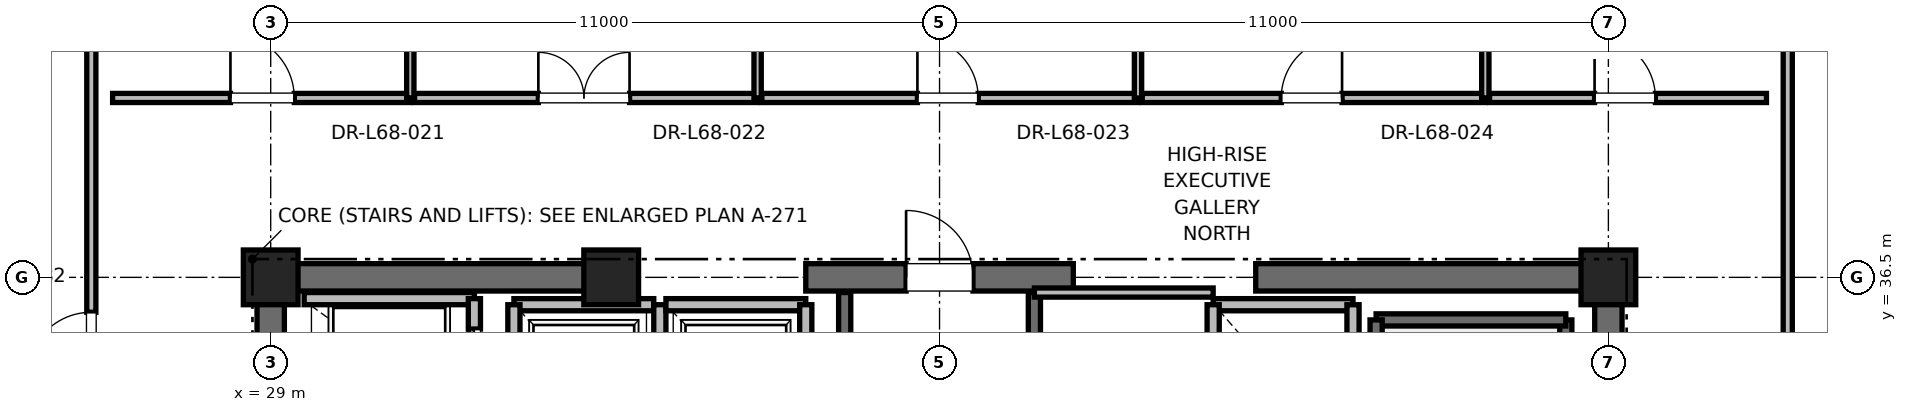
"""IFC4 building model, lengths in metres.
Left out: names, types, materials, properties, quantities, classifications, styles, units other than length and angle.
Written with IfcOpenShell. Run it as: python <this file> out.ifc"""

import sys

from ifc_helpers import new_model, si_unit, direction, frame, frame_2d, origin, origin_2d, place, context, subcontext, project, spatial, rectangle, extrude, element, fill, save


model = new_model("IFC4")
c1 = context("Model", 3, precision=1e-05, world=origin(), true_north=direction((0.0, 1.0)))
c2 = subcontext(c1, "Body", "Model", "MODEL_VIEW")
j1 = project(units=[si_unit("LENGTHUNIT", "METRE"), si_unit("PLANEANGLEUNIT", "RADIAN")], contexts=[c1])
p1 = place(None, origin())
s1 = spatial("IfcSite", under=j1, at=p1, CompositionType="ELEMENT")
p2 = place(p1, origin())
s2 = spatial("IfcBuilding", under=s1, at=p2, CompositionType="ELEMENT")
p3 = place(p2, frame((0.0, 0.0, 291.2)))
s3 = spatial("IfcBuildingStorey", under=s2, at=p3, CompositionType="ELEMENT", Elevation=291.2)
for number, where, z_axis, x_axis in (
    (1, (29.0, 36.5, 0.0), (0.0, 0.0, 1.0), (1.0, 0.0, 0.0)),
    (2, (51.0, 36.5, 0.0), (0.0, 0.0, 1.0), (1.0, 0.0, 0.0)),
    (3, (34.6, 36.5, 0.0), (0.0, 0.0, 1.0), (1.0, 0.0, 0.0)),
):
    element("IfcColumn", number, at=place(p3, frame(where, z_axis=z_axis, x_axis=x_axis)), inside=s3, PredefinedType="PILASTER", context=c2, shape_type="SweptSolid", body=[
        extrude(rectangle(XDim=0.9, YDim=0.9, at=origin_2d()), origin(), (0.0, 0.0, 1.0), 4.0),
    ])
p4 = place(p3, frame((29.0, 36.5, 0.0), z_axis=(0.0, 0.0, 1.0), x_axis=(1.0, 0.0, 0.0)))
e4 = element("IfcWall", 4, at=p4, inside=s3, PredefinedType="SHEAR", context=c2, shape_type="SweptSolid", body=[
    extrude(rectangle(XDim=5.8, YDim=0.45, at=frame_2d((2.9, 0.0))), origin(), (0.0, 0.0, 1.0), 3.7),
])
p5 = place(p3, frame((37.8, 36.5, 0.0), z_axis=(0.0, 0.0, 1.0), x_axis=(1.0, 0.0, 0.0)))
e5 = element("IfcWall", 5, at=p5, inside=s3, PredefinedType="SHEAR", context=c2, shape_type="SweptSolid", body=[
    extrude(rectangle(XDim=4.4, YDim=0.45, at=frame_2d((2.2, 0.0))), origin(), (0.0, 0.0, 1.0), 3.7),
])
p6 = place(p5, frame((1.65, 0.0, 0.0)))
e6 = element("IfcOpeningElement", 6, at=p6, cuts=e5, PredefinedType="OPENING", context=c2, shape_type="SweptSolid", body=[
    extrude(rectangle(XDim=1.1, YDim=2.15, at=frame_2d((0.55, 1.075))), frame((0.0, 0.225, 0.0), z_axis=(0.0, -1.0, 0.0), x_axis=(1.0, 0.0, 0.0)), (0.0, 0.0, 1.0), 0.45),
])
for number, where, z_axis, x_axis in (
    (7, (45.2, 36.5, 0.0), (0.0, 0.0, 1.0), (1.0, 0.0, 0.0)),
    (8, (29.0, 30.7, 0.0), (0.0, 0.0, 1.0), (0.0, 1.0, 0.0)),
):
    element("IfcWall", number, at=place(p3, frame(where, z_axis=z_axis, x_axis=x_axis)), inside=s3, PredefinedType="SHEAR", context=c2, shape_type="SweptSolid", body=[
        extrude(rectangle(XDim=5.8, YDim=0.45, at=frame_2d((2.9, 0.0))), origin(), (0.0, 0.0, 1.0), 3.7),
    ])
p7 = place(p3, frame((51.0, 27.7, 0.0), z_axis=(0.0, 0.0, 1.0), x_axis=(0.0, 1.0, 0.0)))
e9 = element("IfcWall", 9, at=p7, inside=s3, PredefinedType="SHEAR", context=c2, shape_type="SweptSolid", body=[
    extrude(rectangle(XDim=8.8, YDim=0.45, at=frame_2d((4.4, 0.0))), origin(), (0.0, 0.0, 1.0), 3.7),
])
p8 = place(p3, frame((50.3, 27.65, 0.0), z_axis=(0.0, 0.0, 1.0), x_axis=(0.0, 1.0, 0.0)))
e10 = element("IfcWall", 10, at=p8, inside=s3, PredefinedType="SOLIDWALL", context=c2, shape_type="SweptSolid", body=[
    extrude(rectangle(XDim=8.15, YDim=0.2, at=frame_2d((4.075, 0.0))), origin(), (0.0, 0.0, 1.0), 3.7),
])
p9 = place(p3, frame((47.18, 35.8, 0.0), z_axis=(0.0, 0.0, 1.0), x_axis=(1.0, 0.0, 0.0)))
e11 = element("IfcWall", 11, at=p9, inside=s3, PredefinedType="SOLIDWALL", context=c2, shape_type="SweptSolid", body=[
    extrude(rectangle(XDim=3.12, YDim=0.2, at=frame_2d((1.56, 0.0))), origin(), (0.0, 0.0, 1.0), 3.7),
])
p10 = place(p3, frame((47.18, 27.62, 0.0), z_axis=(0.0, 0.0, 1.0), x_axis=(0.0, 1.0, 0.0)))
e12 = element("IfcWall", 12, at=p10, inside=s3, PredefinedType="SOLIDWALL", context=c2, shape_type="SweptSolid", body=[
    extrude(rectangle(XDim=8.18, YDim=0.2, at=frame_2d((4.09, 0.0))), origin(), (0.0, 0.0, 1.0), 3.7),
])
p11 = place(p3, frame((38.44, 27.38, 0.0), z_axis=(0.0, 0.0, 1.0), x_axis=(0.0, 1.0, 0.0)))
e13 = element("IfcWall", 13, at=p11, inside=s3, PredefinedType="SOLIDWALL", context=c2, shape_type="SweptSolid", body=[
    extrude(rectangle(XDim=8.87, YDim=0.2, at=frame_2d((4.435, 0.0))), origin(), (0.0, 0.0, 1.0), 3.7),
])
p12 = place(p3, frame((41.56, 27.68, 0.0), z_axis=(0.0, 0.0, 1.0), x_axis=(0.0, 1.0, 0.0)))
e14 = element("IfcWall", 14, at=p12, inside=s3, PredefinedType="SOLIDWALL", context=c2, shape_type="SweptSolid", body=[
    extrude(rectangle(XDim=8.57, YDim=0.2, at=frame_2d((4.285, 0.0))), origin(), (0.0, 0.0, 1.0), 3.7),
])
p13 = place(p3, frame((32.35, 36.15, 0.0), z_axis=(0.0, 0.0, 1.0), x_axis=(-1.0, 0.0, 0.0)))
e15 = element("IfcWall", 15, at=p13, inside=s3, PredefinedType="SOLIDWALL", context=c2, shape_type="SweptSolid", body=[
    extrude(rectangle(XDim=2.8, YDim=0.2, at=frame_2d((1.4, 0.0))), origin(), (0.0, 0.0, 1.0), 2.753),
])
p14 = place(p3, frame((32.35, 34.05, 0.0), z_axis=(0.0, 0.0, 1.0), x_axis=(0.0, 1.0, 0.0)))
e16 = element("IfcWall", 16, at=p14, inside=s3, PredefinedType="SOLIDWALL", context=c2, shape_type="SweptSolid", body=[
    extrude(rectangle(XDim=2.1, YDim=0.2, at=frame_2d((1.05, 0.0))), origin(), (0.0, 0.0, 1.0), 3.7),
])
p15 = place(p14, frame((0.5, 0.0, 0.0)))
e17 = element("IfcOpeningElement", 17, at=p15, cuts=e16, PredefinedType="OPENING", context=c2, shape_type="SweptSolid", body=[
    extrude(rectangle(XDim=1.1, YDim=2.2, at=frame_2d((0.55, 1.1))), frame((0.0, 0.1, 0.0), z_axis=(0.0, -1.0, 0.0), x_axis=(1.0, 0.0, 0.0)), (0.0, 0.0, 1.0), 0.2),
])
p16 = place(p3, frame((35.3, 36.05, 0.0), z_axis=(0.0, 0.0, 1.0), x_axis=(-1.0, 0.0, 0.0)))
e18 = element("IfcWall", 18, at=p16, inside=s3, PredefinedType="SOLIDWALL", context=c2, shape_type="SweptSolid", body=[
    extrude(rectangle(XDim=2.3, YDim=0.2, at=frame_2d((1.15, 0.0))), origin(), (0.0, 0.0, 1.0), 2.78),
])
p17 = place(p3, frame((33.0, 36.05, 0.0), z_axis=(0.0, 0.0, 1.0), x_axis=(0.0, -1.0, 0.0)))
e19 = element("IfcWall", 19, at=p17, inside=s3, PredefinedType="SOLIDWALL", context=c2, shape_type="SweptSolid", body=[
    extrude(rectangle(XDim=2.6, YDim=0.2, at=frame_2d((1.3, 0.0))), origin(), (0.0, 0.0, 1.0), 3.7),
])
p18 = place(p3, frame((35.4, 33.45, 0.0), z_axis=(0.0, 0.0, 1.0), x_axis=(0.0, 1.0, 0.0)))
e20 = element("IfcWall", 20, at=p18, inside=s3, PredefinedType="SOLIDWALL", context=c2, shape_type="SweptSolid", body=[
    extrude(rectangle(XDim=2.6, YDim=0.2, at=frame_2d((1.3, 0.0))), origin(), (0.0, 0.0, 1.0), 2.78),
])
p19 = place(p3, frame((37.8, 36.05, 0.0), z_axis=(0.0, 0.0, 1.0), x_axis=(-1.0, 0.0, 0.0)))
e21 = element("IfcWall", 21, at=p19, inside=s3, PredefinedType="SOLIDWALL", context=c2, shape_type="SweptSolid", body=[
    extrude(rectangle(XDim=2.3, YDim=0.2, at=frame_2d((1.15, 0.0))), origin(), (0.0, 0.0, 1.0), 2.78),
])
p20 = place(p3, frame((37.8, 33.45, 0.0), z_axis=(0.0, 0.0, 1.0), x_axis=(0.0, 1.0, 0.0)))
e22 = element("IfcWall", 22, at=p20, inside=s3, PredefinedType="SOLIDWALL", context=c2, shape_type="SweptSolid", body=[
    extrude(rectangle(XDim=2.6, YDim=0.2, at=frame_2d((1.3, 0.0))), origin(), (0.0, 0.0, 1.0), 2.78),
])
p21 = place(p3, frame((46.8, 36.05, 0.0), z_axis=(0.0, 0.0, 1.0), x_axis=(-1.0, 0.0, 0.0)))
e23 = element("IfcWall", 23, at=p21, inside=s3, PredefinedType="SOLIDWALL", context=c2, shape_type="SweptSolid", body=[
    extrude(rectangle(XDim=2.3, YDim=0.2, at=frame_2d((1.15, 0.0))), origin(), (0.0, 0.0, 1.0), 2.78),
])
p22 = place(p3, frame((44.5, 36.05, 0.0), z_axis=(0.0, 0.0, 1.0), x_axis=(0.0, -1.0, 0.0)))
e24 = element("IfcWall", 24, at=p22, inside=s3, PredefinedType="SOLIDWALL", context=c2, shape_type="SweptSolid", body=[
    extrude(rectangle(XDim=2.6, YDim=0.2, at=frame_2d((1.3, 0.0))), origin(), (0.0, 0.0, 1.0), 2.78),
])
p23 = place(p3, frame((46.8, 33.45, 0.0), z_axis=(0.0, 0.0, 1.0), x_axis=(0.0, 1.0, 0.0)))
e25 = element("IfcWall", 25, at=p23, inside=s3, PredefinedType="SOLIDWALL", context=c2, shape_type="SweptSolid", body=[
    extrude(rectangle(XDim=2.6, YDim=0.2, at=frame_2d((1.3, 0.0))), origin(), (0.0, 0.0, 1.0), 3.7),
])
p24 = place(p3, frame((41.56, 36.25, 0.0), z_axis=(0.0, 0.0, 1.0), x_axis=(1.0, 0.0, 0.0)))
e26 = element("IfcWall", 26, at=p24, inside=s3, PredefinedType="PARTITIONING", context=c2, shape_type="SweptSolid", body=[
    extrude(rectangle(XDim=2.94, YDim=0.15, at=frame_2d((1.47, 0.0))), origin(), (0.0, 0.0, 1.0), 2.78),
])
p25 = place(p3, frame((26.4, 39.45, 0.0), z_axis=(0.0, 0.0, 1.0), x_axis=(1.0, 0.0, 0.0)))
e27 = element("IfcWall", 27, at=p25, inside=s3, PredefinedType="PARTITIONING", context=c2, shape_type="SweptSolid", body=[
    extrude(rectangle(XDim=4.896, YDim=0.15, at=frame_2d((2.448, 0.0))), origin(), (0.0, 0.0, 1.0), 2.753),
])
p26 = place(p25, frame((1.938, 0.0, 0.0)))
e28 = element("IfcOpeningElement", 28, at=p26, cuts=e27, PredefinedType="OPENING", context=c2, shape_type="SweptSolid", body=[
    extrude(rectangle(XDim=1.05, YDim=2.2, at=frame_2d((0.525, 1.1))), frame((0.0, 0.075, 0.0), z_axis=(0.0, -1.0, 0.0), x_axis=(1.0, 0.0, 0.0)), (0.0, 0.0, 1.0), 0.15),
])
p27 = place(p3, frame((31.296, 39.45, 0.0), z_axis=(0.0, 0.0, 1.0), x_axis=(0.0, 1.0, 0.0)))
e29 = element("IfcWall", 29, at=p27, inside=s3, PredefinedType="PARTITIONING", context=c2, shape_type="SweptSolid", body=[
    extrude(rectangle(XDim=9.831, YDim=0.12, at=frame_2d((4.915, 0.0))), origin(), (0.0, 0.0, 1.0), 2.33),
])
p28 = place(p3, frame((31.366, 39.45, 0.0), z_axis=(0.0, 0.0, 1.0), x_axis=(1.0, 0.0, 0.0)))
e30 = element("IfcWall", 30, at=p28, inside=s3, PredefinedType="PARTITIONING", context=c2, shape_type="SweptSolid", body=[
    extrude(rectangle(XDim=5.642, YDim=0.15, at=frame_2d((2.821, 0.0))), origin(), (0.0, 0.0, 1.0), 2.85),
])
p29 = place(p28, frame((2.036, 0.0, 0.0)))
e31 = element("IfcOpeningElement", 31, at=p29, cuts=e30, PredefinedType="OPENING", context=c2, shape_type="SweptSolid", body=[
    extrude(rectangle(XDim=1.5, YDim=2.25, at=frame_2d((0.75, 1.125))), frame((0.0, 0.075, 0.0), z_axis=(0.0, -1.0, 0.0), x_axis=(1.0, 0.0, 0.0)), (0.0, 0.0, 1.0), 0.15),
])
p30 = place(p3, frame((37.008, 39.45, 0.0), z_axis=(0.0, 0.0, 1.0), x_axis=(0.0, 1.0, 0.0)))
e32 = element("IfcWall", 32, at=p30, inside=s3, PredefinedType="PARTITIONING", context=c2, shape_type="SweptSolid", body=[
    extrude(rectangle(XDim=9.831, YDim=0.12, at=frame_2d((4.915, 0.0))), origin(), (0.0, 0.0, 1.0), 2.33),
])
p31 = place(p3, frame((37.078, 39.45, 0.0), z_axis=(0.0, 0.0, 1.0), x_axis=(1.0, 0.0, 0.0)))
e33 = element("IfcWall", 33, at=p31, inside=s3, PredefinedType="PARTITIONING", context=c2, shape_type="SweptSolid", body=[
    extrude(rectangle(XDim=6.186, YDim=0.15, at=frame_2d((3.093, 0.0))), origin(), (0.0, 0.0, 1.0), 2.85),
])
p32 = place(p31, frame((2.558, 0.0, 0.0)))
e34 = element("IfcOpeningElement", 34, at=p32, cuts=e33, PredefinedType="OPENING", context=c2, shape_type="SweptSolid", body=[
    extrude(rectangle(XDim=1.0, YDim=2.15, at=frame_2d((0.5, 1.075))), frame((0.0, 0.075, 0.0), z_axis=(0.0, -1.0, 0.0), x_axis=(1.0, 0.0, 0.0)), (0.0, 0.0, 1.0), 0.15),
])
p33 = place(p3, frame((43.264, 39.45, 0.0), z_axis=(0.0, 0.0, 1.0), x_axis=(0.0, 1.0, 0.0)))
e35 = element("IfcWall", 35, at=p33, inside=s3, PredefinedType="PARTITIONING", context=c2, shape_type="SweptSolid", body=[
    extrude(rectangle(XDim=9.831, YDim=0.12, at=frame_2d((4.915, 0.0))), origin(), (0.0, 0.0, 1.0), 2.33),
])
p34 = place(p3, frame((43.334, 39.45, 0.0), z_axis=(0.0, 0.0, 1.0), x_axis=(1.0, 0.0, 0.0)))
e36 = element("IfcWall", 36, at=p34, inside=s3, PredefinedType="PARTITIONING", context=c2, shape_type="SweptSolid", body=[
    extrude(rectangle(XDim=5.642, YDim=0.15, at=frame_2d((2.821, 0.0))), origin(), (0.0, 0.0, 1.0), 2.85),
])
p35 = place(p34, frame((2.286, 0.0, 0.0)))
e37 = element("IfcOpeningElement", 37, at=p35, cuts=e36, PredefinedType="OPENING", context=c2, shape_type="SweptSolid", body=[
    extrude(rectangle(XDim=1.0, YDim=2.15, at=frame_2d((0.5, 1.075))), frame((0.0, 0.075, 0.0), z_axis=(0.0, -1.0, 0.0), x_axis=(1.0, 0.0, 0.0)), (0.0, 0.0, 1.0), 0.15),
])
p36 = place(p3, frame((48.976, 39.45, 0.0), z_axis=(0.0, 0.0, 1.0), x_axis=(0.0, 1.0, 0.0)))
e38 = element("IfcWall", 38, at=p36, inside=s3, PredefinedType="PARTITIONING", context=c2, shape_type="SweptSolid", body=[
    extrude(rectangle(XDim=9.831, YDim=0.12, at=frame_2d((4.915, 0.0))), origin(), (0.0, 0.0, 1.0), 2.33),
])
p37 = place(p3, frame((49.046, 39.45, 0.0), z_axis=(0.0, 0.0, 1.0), x_axis=(1.0, 0.0, 0.0)))
e39 = element("IfcWall", 39, at=p37, inside=s3, PredefinedType="PARTITIONING", context=c2, shape_type="SweptSolid", body=[
    extrude(rectangle(XDim=4.554, YDim=0.15, at=frame_2d((2.277, 0.0))), origin(), (0.0, 0.0, 1.0), 2.753),
])
p38 = place(p37, frame((1.727, 0.0, 0.0)))
e40 = element("IfcOpeningElement", 40, at=p38, cuts=e39, PredefinedType="OPENING", context=c2, shape_type="SweptSolid", body=[
    extrude(rectangle(XDim=1.0, YDim=2.15, at=frame_2d((0.5, 1.075))), frame((0.0, 0.075, 0.0), z_axis=(0.0, -1.0, 0.0), x_axis=(1.0, 0.0, 0.0)), (0.0, 0.0, 1.0), 0.15),
])
p39 = place(p3, frame((26.05, 34.403, 0.0), z_axis=(0.0, 0.0, 1.0), x_axis=(0.0, 1.0, 0.0)))
e41 = element("IfcWall", 41, at=p39, inside=s3, PredefinedType="PARTITIONING", context=c2, shape_type="SweptSolid", body=[
    extrude(rectangle(XDim=11.078, YDim=0.15, at=frame_2d((5.539, 0.0))), origin(), (0.0, 0.0, 1.0), 2.753),
])
p40 = place(p39, frame((0.474, 0.0, 0.0)))
e42 = element("IfcOpeningElement", 42, at=p40, cuts=e41, PredefinedType="OPENING", context=c2, shape_type="SweptSolid", body=[
    extrude(rectangle(XDim=1.05, YDim=2.2, at=frame_2d((0.525, 1.1))), frame((0.0, 0.075, 0.0), z_axis=(0.0, -1.0, 0.0), x_axis=(1.0, 0.0, 0.0)), (0.0, 0.0, 1.0), 0.15),
])
p41 = place(p3, frame((53.95, 24.693, 0.0), z_axis=(0.0, 0.0, 1.0), x_axis=(0.0, 1.0, 0.0)))
e43 = element("IfcWall", 43, at=p41, inside=s3, PredefinedType="PARTITIONING", context=c2, shape_type="SweptSolid", body=[
    extrude(rectangle(XDim=20.788, YDim=0.15, at=frame_2d((10.394, 0.0))), origin(), (0.0, 0.0, 1.0), 2.753),
])
p42 = place(p41, frame((5.354, 0.0, 0.0)))
e44 = element("IfcOpeningElement", 44, at=p42, cuts=e43, PredefinedType="OPENING", context=c2, shape_type="SweptSolid", body=[
    extrude(rectangle(XDim=1.0, YDim=2.15, at=frame_2d((0.5, 1.075))), frame((0.0, 0.075, 0.0), z_axis=(0.0, -1.0, 0.0), x_axis=(1.0, 0.0, 0.0)), (0.0, 0.0, 1.0), 0.15),
])
p43 = place(p6, origin())
e45 = element("IfcDoor", 45, at=p43, inside=s3, OperationType="SINGLE_SWING_LEFT", PredefinedType="DOOR", context=c2, shape_type="SweptSolid", body=[
    extrude(rectangle(XDim=1.1, YDim=2.15, at=frame_2d((0.55, 1.075))), frame((0.0, 0.025, 0.0), z_axis=(0.0, -1.0, 0.0), x_axis=(1.0, 0.0, 0.0)), (0.0, 0.0, 1.0), 0.05),
])
fill(e6, e45)
p44 = place(p15, origin())
e46 = element("IfcDoor", 46, at=p44, inside=s3, OperationType="SLIDING_TO_RIGHT", PredefinedType="DOOR", context=c2, shape_type="SweptSolid", body=[
    extrude(rectangle(XDim=1.1, YDim=2.2, at=frame_2d((0.55, 1.1))), frame((0.0, 0.025, 0.0), z_axis=(0.0, -1.0, 0.0), x_axis=(1.0, 0.0, 0.0)), (0.0, 0.0, 1.0), 0.05),
])
fill(e17, e46)
p45 = place(p26, origin())
e47 = element("IfcDoor", 47, at=p45, inside=s3, OperationType="SINGLE_SWING_LEFT", PredefinedType="DOOR", context=c2, shape_type="SweptSolid", body=[
    extrude(rectangle(XDim=1.05, YDim=2.2, at=frame_2d((0.525, 1.1))), frame((0.0, 0.025, 0.0), z_axis=(0.0, -1.0, 0.0), x_axis=(1.0, 0.0, 0.0)), (0.0, 0.0, 1.0), 0.05),
])
fill(e28, e47)
p46 = place(p29, origin())
e48 = element("IfcDoor", 48, at=p46, inside=s3, OperationType="DOUBLE_DOOR_SINGLE_SWING", PredefinedType="DOOR", context=c2, shape_type="SweptSolid", body=[
    extrude(rectangle(XDim=1.5, YDim=2.25, at=frame_2d((0.75, 1.125))), frame((0.0, 0.025, 0.0), z_axis=(0.0, -1.0, 0.0), x_axis=(1.0, 0.0, 0.0)), (0.0, 0.0, 1.0), 0.05),
])
fill(e31, e48)
p47 = place(p32, origin())
e49 = element("IfcDoor", 49, at=p47, inside=s3, OperationType="SINGLE_SWING_LEFT", PredefinedType="DOOR", context=c2, shape_type="SweptSolid", body=[
    extrude(rectangle(XDim=1.0, YDim=2.15, at=frame_2d((0.5, 1.075))), frame((0.0, 0.025, 0.0), z_axis=(0.0, -1.0, 0.0), x_axis=(1.0, 0.0, 0.0)), (0.0, 0.0, 1.0), 0.05),
])
fill(e34, e49)
p48 = place(p35, origin())
e50 = element("IfcDoor", 50, at=p48, inside=s3, OperationType="SINGLE_SWING_RIGHT", PredefinedType="DOOR", context=c2, shape_type="SweptSolid", body=[
    extrude(rectangle(XDim=1.0, YDim=2.15, at=frame_2d((0.5, 1.075))), frame((0.0, 0.025, 0.0), z_axis=(0.0, -1.0, 0.0), x_axis=(1.0, 0.0, 0.0)), (0.0, 0.0, 1.0), 0.05),
])
fill(e37, e50)
p49 = place(p38, origin())
e51 = element("IfcDoor", 51, at=p49, inside=s3, OperationType="SINGLE_SWING_LEFT", PredefinedType="DOOR", context=c2, shape_type="SweptSolid", body=[
    extrude(rectangle(XDim=1.0, YDim=2.15, at=frame_2d((0.5, 1.075))), frame((0.0, 0.025, 0.0), z_axis=(0.0, -1.0, 0.0), x_axis=(1.0, 0.0, 0.0)), (0.0, 0.0, 1.0), 0.05),
])
fill(e40, e51)
p50 = place(p40, origin())
e52 = element("IfcDoor", 52, at=p50, inside=s3, OperationType="SINGLE_SWING_LEFT", PredefinedType="DOOR", context=c2, shape_type="SweptSolid", body=[
    extrude(rectangle(XDim=1.05, YDim=2.2, at=frame_2d((0.525, 1.1))), frame((0.0, 0.025, 0.0), z_axis=(0.0, -1.0, 0.0), x_axis=(1.0, 0.0, 0.0)), (0.0, 0.0, 1.0), 0.05),
])
fill(e42, e52)
save(model, sys.argv[1])
